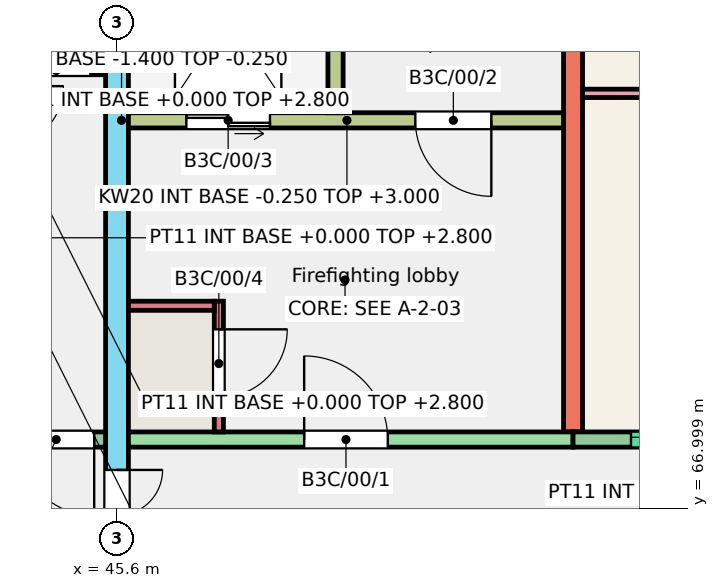
"""IFC4 building model, lengths in metres.
Left out: names, types, materials, properties, quantities, classifications, styles, units other than length and angle.
Written with IfcOpenShell. Run it as: python <this file> out.ifc"""

import sys

from ifc_helpers import new_model, si_unit, direction, frame, frame_2d, origin, place, context, subcontext, project, spatial, rectangle, extrude, element, fill, save


model = new_model("IFC4")
c1 = context("Model", 3, precision=1e-05, world=origin(), true_north=direction((0.0, 1.0)))
c2 = subcontext(c1, "Body", "Model", "MODEL_VIEW")
j1 = project(units=[si_unit("LENGTHUNIT", "METRE"), si_unit("PLANEANGLEUNIT", "RADIAN")], contexts=[c1])
p1 = place(None, origin())
s1 = spatial("IfcSite", under=j1, at=p1, CompositionType="ELEMENT")
p2 = place(p1, origin())
s2 = spatial("IfcBuilding", under=s1, at=p2, CompositionType="ELEMENT")
p3 = place(p2, origin())
s3 = spatial("IfcBuildingStorey", under=s2, at=p3, CompositionType="ELEMENT", Elevation=0.0)
p4 = place(p3, frame((45.6, 66.0, -0.25), z_axis=(0.0, 0.0, 1.0), x_axis=(0.0, 1.0, 0.0)))
e1 = element("IfcWall", 1, at=p4, inside=s3, PredefinedType="SHEAR", context=c2, shape_type="SweptSolid", body=[
    extrude(rectangle(XDim=11.0, YDim=0.3, at=frame_2d((5.5, 0.0))), origin(), (0.0, 0.0, 1.0), 3.25),
])
p5 = place(p4, frame((0.3, 0.0, 0.25)))
e2 = element("IfcOpeningElement", 2, at=p5, cuts=e1, PredefinedType="OPENING", context=c2, shape_type="SweptSolid", body=[
    extrude(rectangle(XDim=1.2, YDim=2.1, at=frame_2d((0.6, 1.05))), frame((0.0, 0.16, 0.0), z_axis=(0.0, -1.0, 0.0), x_axis=(1.0, 0.0, 0.0)), (0.0, 0.0, 1.0), 0.32),
])
p6 = place(p3, frame((51.6, 68.0, -0.25), z_axis=(0.0, 0.0, 1.0), x_axis=(0.0, 1.0, 0.0)))
e3 = element("IfcWall", 3, at=p6, inside=s3, PredefinedType="SHEAR", context=c2, shape_type="SweptSolid", body=[
    extrude(rectangle(XDim=9.0, YDim=0.25, at=frame_2d((4.5, 0.0))), origin(), (0.0, 0.0, 1.0), 3.25),
])
p7 = place(p3, frame((42.0, 67.9, -0.25), z_axis=(0.0, 0.0, 1.0), x_axis=(1.0, 0.0, 0.0)))
e4 = element("IfcWall", 4, at=p7, inside=s3, PredefinedType="SOLIDWALL", context=c2, shape_type="SweptSolid", body=[
    extrude(rectangle(XDim=3.45, YDim=0.2, at=frame_2d((1.725, 0.0))), origin(), (0.0, 0.0, 1.0), 3.25),
])
p8 = place(p7, frame((0.482, 0.0, 1.35)))
e5 = element("IfcOpeningElement", 5, at=p8, cuts=e4, PredefinedType="OPENING", context=c2, shape_type="SweptSolid", body=[
    extrude(rectangle(XDim=1.2, YDim=1.3, at=frame_2d((0.6, 0.65))), frame((0.0, 0.11, 0.0), z_axis=(0.0, -1.0, 0.0), x_axis=(1.0, 0.0, 0.0)), (0.0, 0.0, 1.0), 0.22),
])
p9 = place(p7, frame((2.3, 0.0, 0.25)))
e6 = element("IfcOpeningElement", 6, at=p9, cuts=e4, PredefinedType="OPENING", context=c2, shape_type="SweptSolid", body=[
    extrude(rectangle(XDim=1.0, YDim=2.1, at=frame_2d((0.5, 1.05))), frame((0.0, 0.11, 0.0), z_axis=(0.0, -1.0, 0.0), x_axis=(1.0, 0.0, 0.0)), (0.0, 0.0, 1.0), 0.22),
])
p10 = place(p3, frame((45.75, 67.9, -0.25), z_axis=(0.0, 0.0, 1.0), x_axis=(1.0, 0.0, 0.0)))
e7 = element("IfcWall", 7, at=p10, inside=s3, PredefinedType="SHEAR", context=c2, shape_type="SweptSolid", body=[
    extrude(rectangle(XDim=5.85, YDim=0.2, at=frame_2d((2.925, 0.0))), origin(), (0.0, 0.0, 1.0), 3.25),
])
p11 = place(p10, frame((2.312, 0.0, 0.25)))
e8 = element("IfcOpeningElement", 8, at=p11, cuts=e7, PredefinedType="OPENING", context=c2, shape_type="SweptSolid", body=[
    extrude(rectangle(XDim=1.1, YDim=2.1, at=frame_2d((0.55, 1.05))), frame((0.0, 0.11, 0.0), z_axis=(0.0, -1.0, 0.0), x_axis=(1.0, 0.0, 0.0)), (0.0, 0.0, 1.0), 0.22),
])
p12 = place(p3, frame((45.75, 72.1, -0.25), z_axis=(0.0, 0.0, 1.0), x_axis=(1.0, 0.0, 0.0)))
e9 = element("IfcWall", 9, at=p12, inside=s3, PredefinedType="SHEAR", context=c2, shape_type="SweptSolid", body=[
    extrude(rectangle(XDim=5.725, YDim=0.2, at=frame_2d((2.863, 0.0))), origin(), (0.0, 0.0, 1.0), 3.25),
])
p13 = place(p12, frame((3.775, 0.0, 0.25)))
e10 = element("IfcOpeningElement", 10, at=p13, cuts=e9, PredefinedType="OPENING", context=c2, shape_type="SweptSolid", body=[
    extrude(rectangle(XDim=1.0, YDim=2.1, at=frame_2d((0.5, 1.05))), frame((0.0, 0.11, 0.0), z_axis=(0.0, -1.0, 0.0), x_axis=(1.0, 0.0, 0.0)), (0.0, 0.0, 1.0), 0.22),
])
p14 = place(p12, frame((0.762, 0.0, 0.25)))
e11 = element("IfcOpeningElement", 11, at=p14, cuts=e9, PredefinedType="OPENING", context=c2, shape_type="SweptSolid", body=[
    extrude(rectangle(XDim=1.1, YDim=2.1, at=frame_2d((0.55, 1.05))), frame((0.0, 0.11, 0.0), z_axis=(0.0, -1.0, 0.0), x_axis=(1.0, 0.0, 0.0)), (0.0, 0.0, 1.0), 0.22),
])
p15 = place(p3, frame((48.475, 72.2, -0.25), z_axis=(0.0, 0.0, 1.0), x_axis=(0.0, 1.0, 0.0)))
e12 = element("IfcWall", 12, at=p15, inside=s3, PredefinedType="SHEAR", context=c2, shape_type="SweptSolid", body=[
    extrude(rectangle(XDim=4.8, YDim=0.2, at=frame_2d((2.4, 0.0))), origin(), (0.0, 0.0, 1.0), 3.25),
])
p16 = place(p3, frame((46.94, 68.0, -0.25), z_axis=(0.0, 0.0, 1.0), x_axis=(0.0, 1.0, 0.0)))
e13 = element("IfcWall", 13, at=p16, inside=s3, PredefinedType="SHEAR", context=c2, shape_type="SweptSolid", body=[
    extrude(rectangle(XDim=1.72, YDim=0.12, at=frame_2d((0.86, 0.0))), origin(), (0.0, 0.0, 1.0), 3.25),
])
p17 = place(p16, frame((0.45, 0.0, 0.25)))
e14 = element("IfcOpeningElement", 14, at=p17, cuts=e13, PredefinedType="OPENING", context=c2, shape_type="SweptSolid", body=[
    extrude(rectangle(XDim=0.9, YDim=2.1, at=frame_2d((0.45, 1.05))), frame((0.0, 0.07, 0.0), z_axis=(0.0, -1.0, 0.0), x_axis=(1.0, 0.0, 0.0)), (0.0, 0.0, 1.0), 0.14),
])
p18 = place(p3, frame((45.75, 69.66, -0.25), z_axis=(0.0, 0.0, 1.0), x_axis=(1.0, 0.0, 0.0)))
e15 = element("IfcWall", 15, at=p18, inside=s3, PredefinedType="SHEAR", context=c2, shape_type="SweptSolid", body=[
    extrude(rectangle(XDim=1.13, YDim=0.12, at=frame_2d((0.565, 0.0))), origin(), (0.0, 0.0, 1.0), 3.25),
])
p19 = place(p3, frame((51.6, 67.9, -0.25), z_axis=(0.0, 0.0, 1.0), x_axis=(1.0, 0.0, 0.0)))
e16 = element("IfcWall", 16, at=p19, inside=s3, PredefinedType="SOLIDWALL", context=c2, shape_type="SweptSolid", body=[
    extrude(rectangle(XDim=3.6, YDim=0.2, at=frame_2d((1.8, 0.0))), origin(), (0.0, 0.0, 1.0), 3.25),
])
p20 = place(p19, frame((0.762, 0.0, 1.45)))
e17 = element("IfcOpeningElement", 17, at=p20, cuts=e16, PredefinedType="OPENING", context=c2, shape_type="SweptSolid", body=[
    extrude(rectangle(XDim=2.1, YDim=1.2, at=frame_2d((1.05, 0.6))), frame((0.0, 0.11, 0.0), z_axis=(0.0, -1.0, 0.0), x_axis=(1.0, 0.0, 0.0)), (0.0, 0.0, 1.0), 0.22),
])
p21 = place(p3, frame((45.6, 72.1, -1.4), z_axis=(0.0, 0.0, 1.0), x_axis=(1.0, 0.0, 0.0)))
e18 = element("IfcWall", 18, at=p21, inside=s3, PredefinedType="SHEAR", context=c2, shape_type="SweptSolid", body=[
    extrude(rectangle(XDim=2.975, YDim=0.2, at=frame_2d((1.487, 0.0))), origin(), (0.0, 0.0, 1.0), 1.15),
])
p22 = place(p3, frame((48.475, 72.2, -1.4), z_axis=(0.0, 0.0, 1.0), x_axis=(0.0, 1.0, 0.0)))
e19 = element("IfcWall", 19, at=p22, inside=s3, PredefinedType="SHEAR", context=c2, shape_type="SweptSolid", body=[
    extrude(rectangle(XDim=3.0, YDim=0.2, at=frame_2d((1.5, 0.0))), origin(), (0.0, 0.0, 1.0), 1.15),
])
p23 = place(p3, frame((45.675, 72.2, -1.4), z_axis=(0.0, 0.0, 1.0), x_axis=(0.0, 1.0, 0.0)))
e20 = element("IfcWall", 20, at=p23, inside=s3, PredefinedType="SHEAR", context=c2, shape_type="SweptSolid", body=[
    extrude(rectangle(XDim=3.0, YDim=0.15, at=frame_2d((1.5, 0.0))), origin(), (0.0, 0.0, 1.0), 1.15),
])
p24 = place(p3, frame((42.125, 72.755, 0.0), z_axis=(0.0, 0.0, 1.0), x_axis=(1.0, 0.0, 0.0)))
e21 = element("IfcWall", 21, at=p24, inside=s3, PredefinedType="PARTITIONING", context=c2, shape_type="SweptSolid", body=[
    extrude(rectangle(XDim=3.325, YDim=0.11, at=frame_2d((1.663, 0.0))), origin(), (0.0, 0.0, 1.0), 2.8),
])
p25 = place(p24, frame((2.225, 0.0, 0.0)))
e22 = element("IfcOpeningElement", 22, at=p25, cuts=e21, PredefinedType="OPENING", context=c2, shape_type="SweptSolid", body=[
    extrude(rectangle(XDim=0.9, YDim=2.1, at=frame_2d((0.45, 1.05))), frame((0.0, 0.065, 0.0), z_axis=(0.0, -1.0, 0.0), x_axis=(1.0, 0.0, 0.0)), (0.0, 0.0, 1.0), 0.13),
])
p26 = place(p3, frame((51.725, 72.455, 0.0), z_axis=(0.0, 0.0, 1.0), x_axis=(1.0, 0.0, 0.0)))
e23 = element("IfcWall", 23, at=p26, inside=s3, PredefinedType="PARTITIONING", context=c2, shape_type="SweptSolid", body=[
    extrude(rectangle(XDim=3.375, YDim=0.11, at=frame_2d((1.688, 0.0))), origin(), (0.0, 0.0, 1.0), 2.8),
])
p27 = place(p20, origin())
e24 = element("IfcWindow", 24, at=p27, inside=s3, PartitioningType="SINGLE_PANEL", PredefinedType="WINDOW", context=c2, shape_type="SweptSolid", body=[
    extrude(rectangle(XDim=2.1, YDim=1.2, at=frame_2d((1.05, 0.6))), frame((0.0, 0.06, 0.0), z_axis=(0.0, -1.0, 0.0), x_axis=(1.0, 0.0, 0.0)), (0.0, 0.0, 1.0), 0.06),
])
fill(e17, e24)
p28 = place(p9, origin())
e25 = element("IfcDoor", 25, at=p28, inside=s3, OperationType="SINGLE_SWING_RIGHT", PredefinedType="DOOR", context=c2, shape_type="SweptSolid", body=[
    extrude(rectangle(XDim=1.0, YDim=2.1, at=frame_2d((0.5, 1.05))), frame((0.0, 0.025, 0.0), z_axis=(0.0, -1.0, 0.0), x_axis=(1.0, 0.0, 0.0)), (0.0, 0.0, 1.0), 0.05),
])
fill(e6, e25)
p29 = place(p25, origin())
e26 = element("IfcDoor", 26, at=p29, inside=s3, OperationType="SINGLE_SWING_LEFT", PredefinedType="DOOR", context=c2, shape_type="SweptSolid", body=[
    extrude(rectangle(XDim=0.9, YDim=2.1, at=frame_2d((0.45, 1.05))), frame((0.0, 0.025, 0.0), z_axis=(0.0, -1.0, 0.0), x_axis=(1.0, 0.0, 0.0)), (0.0, 0.0, 1.0), 0.05),
])
fill(e22, e26)
p30 = place(p11, origin())
e27 = element("IfcDoor", 27, at=p30, inside=s3, OperationType="SINGLE_SWING_LEFT", PredefinedType="DOOR", context=c2, shape_type="SweptSolid", body=[
    extrude(rectangle(XDim=1.1, YDim=2.1, at=frame_2d((0.55, 1.05))), frame((0.0, 0.025, 0.0), z_axis=(0.0, -1.0, 0.0), x_axis=(1.0, 0.0, 0.0)), (0.0, 0.0, 1.0), 0.05),
])
fill(e8, e27)
p31 = place(p13, origin())
e28 = element("IfcDoor", 28, at=p31, inside=s3, OperationType="SINGLE_SWING_RIGHT", PredefinedType="DOOR", context=c2, shape_type="SweptSolid", body=[
    extrude(rectangle(XDim=1.0, YDim=2.1, at=frame_2d((0.5, 1.05))), frame((0.0, 0.025, 0.0), z_axis=(0.0, -1.0, 0.0), x_axis=(1.0, 0.0, 0.0)), (0.0, 0.0, 1.0), 0.05),
])
fill(e10, e28)
p32 = place(p14, origin())
e29 = element("IfcDoor", 29, at=p32, inside=s3, OperationType="DOUBLE_DOOR_SLIDING", PredefinedType="DOOR", context=c2, shape_type="SweptSolid", body=[
    extrude(rectangle(XDim=1.1, YDim=2.1, at=frame_2d((0.55, 1.05))), frame((0.0, 0.025, 0.0), z_axis=(0.0, -1.0, 0.0), x_axis=(1.0, 0.0, 0.0)), (0.0, 0.0, 1.0), 0.05),
])
fill(e11, e29)
p33 = place(p17, origin())
e30 = element("IfcDoor", 30, at=p33, inside=s3, OperationType="SINGLE_SWING_RIGHT", PredefinedType="DOOR", context=c2, shape_type="SweptSolid", body=[
    extrude(rectangle(XDim=0.9, YDim=2.1, at=frame_2d((0.45, 1.05))), frame((0.0, 0.025, 0.0), z_axis=(0.0, -1.0, 0.0), x_axis=(1.0, 0.0, 0.0)), (0.0, 0.0, 1.0), 0.05),
])
fill(e14, e30)
p34 = place(p5, origin())
e31 = element("IfcDoor", 31, at=p34, inside=s3, OperationType="DOUBLE_DOOR_SINGLE_SWING", PredefinedType="DOOR", context=c2, shape_type="SweptSolid", body=[
    extrude(rectangle(XDim=1.2, YDim=2.1, at=frame_2d((0.6, 1.05))), frame((0.0, 0.025, 0.0), z_axis=(0.0, -1.0, 0.0), x_axis=(1.0, 0.0, 0.0)), (0.0, 0.0, 1.0), 0.05),
])
fill(e2, e31)
save(model, sys.argv[1])
